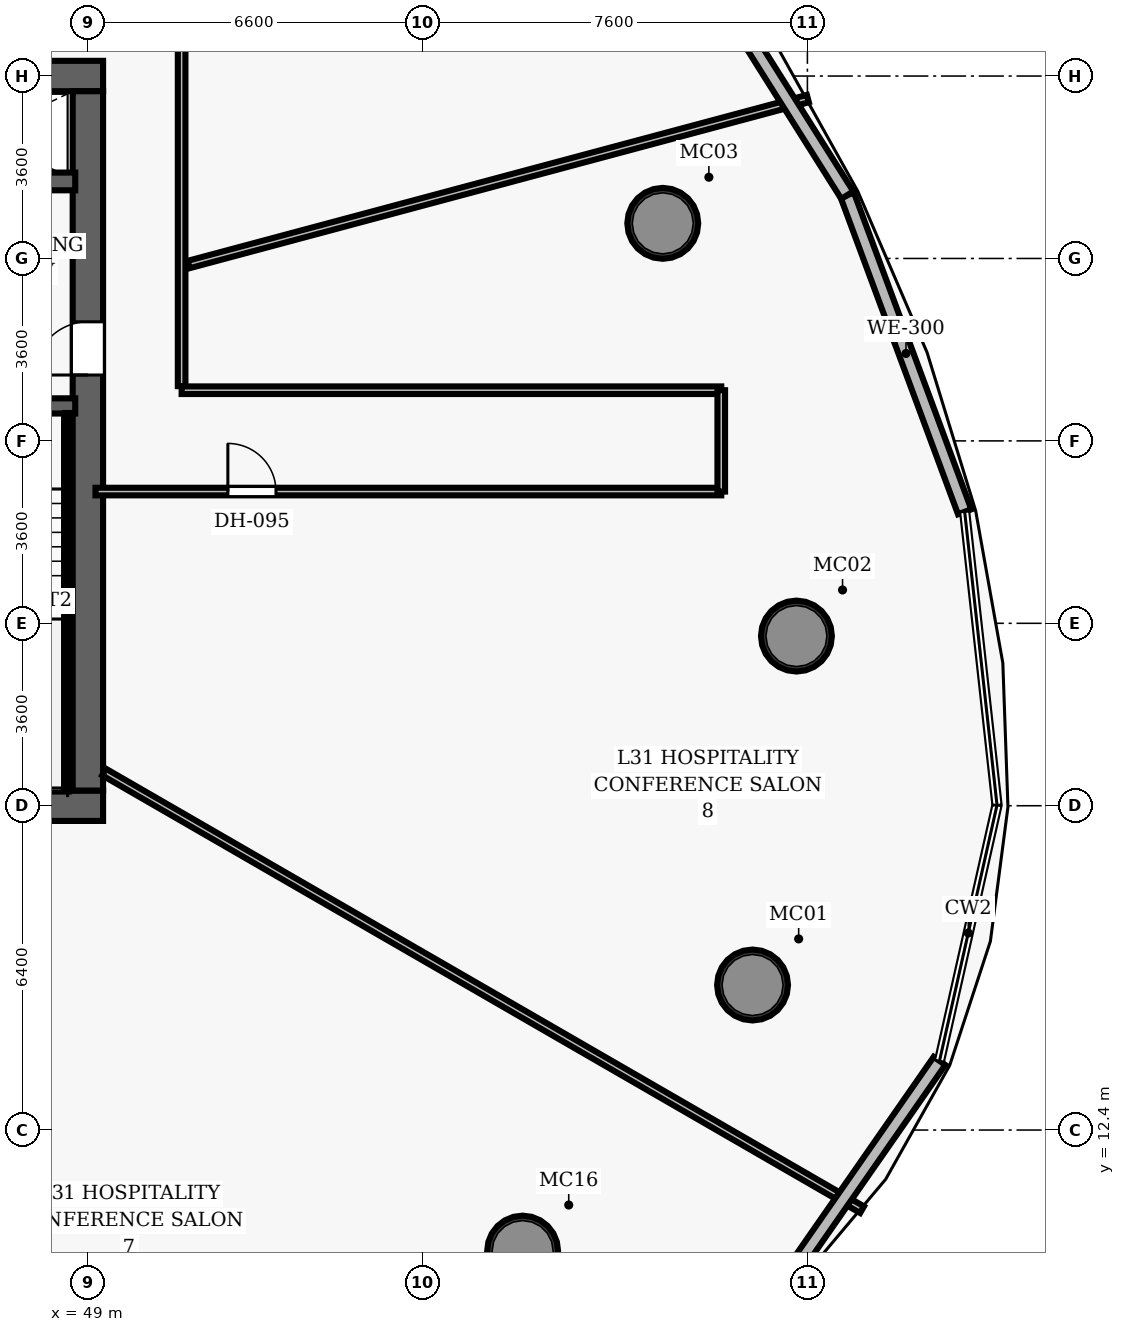
"""IFC4 building model, lengths in metres.
Left out: names, types, materials, properties, quantities, classifications, styles, units other than length and angle.
Written with IfcOpenShell. Run it as: python <this file> out.ifc"""

import sys

from ifc_helpers import new_model, si_unit, direction, frame, frame_2d, origin, origin_2d, place, context, subcontext, project, spatial, rectangle, hollow_circle, extrude, element, fill, save


model = new_model("IFC4")
c1 = context("Model", 3, precision=1e-05, world=origin(), true_north=direction((0.0, 1.0)))
c2 = subcontext(c1, "Body", "Model", "MODEL_VIEW")
j1 = project(units=[si_unit("LENGTHUNIT", "METRE"), si_unit("PLANEANGLEUNIT", "RADIAN")], contexts=[c1])
p1 = place(None, origin())
s1 = spatial("IfcSite", under=j1, at=p1, CompositionType="ELEMENT")
p2 = place(p1, origin())
s2 = spatial("IfcBuilding", under=s1, at=p2, CompositionType="ELEMENT")
p3 = place(p2, frame((0.0, 0.0, 127.3)))
s3 = spatial("IfcBuildingStorey", under=s2, at=p3, CompositionType="ELEMENT", Elevation=127.3)
p4 = place(p3, frame((26.7, 18.8, 0.0), z_axis=(0.0, 0.0, 1.0), x_axis=(1.0, 0.0, 0.0)))
e1 = element("IfcWall", 1, at=p4, inside=s3, PredefinedType="SHEAR", context=c2, shape_type="SweptSolid", body=[
    extrude(rectangle(XDim=22.6, YDim=0.6, at=frame_2d((11.3, 0.0))), origin(), (0.0, 0.0, 1.0), 3.5),
])
p5 = place(p4, frame((14.52, 0.0, 0.0)))
e2 = element("IfcOpeningElement", 2, at=p5, cuts=e1, PredefinedType="OPENING", context=c2, shape_type="SweptSolid", body=[
    extrude(rectangle(XDim=1.05, YDim=2.15, at=frame_2d((0.525, 1.075))), frame((0.0, 0.31, 0.0), z_axis=(0.0, -1.0, 0.0), x_axis=(1.0, 0.0, 0.0)), (0.0, 0.0, 1.0), 0.62),
])
p6 = place(p3, frame((26.7, 33.2, 0.0), z_axis=(0.0, 0.0, 1.0), x_axis=(1.0, 0.0, 0.0)))
e3 = element("IfcWall", 3, at=p6, inside=s3, PredefinedType="SHEAR", context=c2, shape_type="SweptSolid", body=[
    extrude(rectangle(XDim=22.6, YDim=0.6, at=frame_2d((11.3, 0.0))), origin(), (0.0, 0.0, 1.0), 3.5),
])
p7 = place(p6, frame((4.62, 0.0, 0.0)))
e4 = element("IfcOpeningElement", 4, at=p7, cuts=e3, PredefinedType="OPENING", context=c2, shape_type="SweptSolid", body=[
    extrude(rectangle(XDim=1.05, YDim=2.15, at=frame_2d((0.525, 1.075))), frame((0.0, 0.31, 0.0), z_axis=(0.0, -1.0, 0.0), x_axis=(1.0, 0.0, 0.0)), (0.0, 0.0, 1.0), 0.62),
])
p8 = place(p6, frame((14.52, 0.0, 0.0)))
e5 = element("IfcOpeningElement", 5, at=p8, cuts=e3, PredefinedType="OPENING", context=c2, shape_type="SweptSolid", body=[
    extrude(rectangle(XDim=1.05, YDim=2.15, at=frame_2d((0.525, 1.075))), frame((0.0, 0.31, 0.0), z_axis=(0.0, -1.0, 0.0), x_axis=(1.0, 0.0, 0.0)), (0.0, 0.0, 1.0), 0.62),
])
p9 = place(p3, frame((49.0, 19.1, 0.0), z_axis=(0.0, 0.0, 1.0), x_axis=(0.0, 1.0, 0.0)))
e6 = element("IfcWall", 6, at=p9, inside=s3, PredefinedType="SHEAR", context=c2, shape_type="SweptSolid", body=[
    extrude(rectangle(XDim=13.8, YDim=0.6, at=frame_2d((6.9, 0.0))), origin(), (0.0, 0.0, 1.0), 3.5),
])
p10 = place(p9, frame((8.2, 0.0, 0.0)))
e7 = element("IfcOpeningElement", 7, at=p10, cuts=e6, PredefinedType="OPENING", context=c2, shape_type="SweptSolid", body=[
    extrude(rectangle(XDim=1.05, YDim=2.15, at=frame_2d((0.525, 1.075))), frame((0.0, 0.31, 0.0), z_axis=(0.0, -1.0, 0.0), x_axis=(1.0, 0.0, 0.0)), (0.0, 0.0, 1.0), 0.62),
])
for number, where, z_axis, x_axis in (
    (8, (62.118, 15.262, 0.0), (0.0, 0.0, 1.0), (1.0, 0.0, 0.0)),
    (9, (62.984, 22.148, 0.0), (0.0, 0.0, 1.0), (1.0, 0.0, 0.0)),
    (10, (60.346, 30.293, 0.0), (0.0, 0.0, 1.0), (1.0, 0.0, 0.0)),
    (11, (57.58, 10.011, 0.0), (0.0, 0.0, 1.0), (1.0, 0.0, 0.0)),
):
    element("IfcColumn", number, at=place(p3, frame(where, z_axis=z_axis, x_axis=x_axis)), inside=s3, PredefinedType="COLUMN", context=c2, shape_type="SweptSolid", body=[
        extrude(hollow_circle(Radius=0.7, WallThickness=0.055, at=origin_2d()), origin(), (0.0, 0.0, 1.0), 3.5),
    ])
p11 = place(p3, frame((45.08, 26.69, 0.0), z_axis=(0.0, 0.0, 1.0), x_axis=(1.0, 0.0, 0.0)))
e12 = element("IfcWall", 12, at=p11, inside=s3, PredefinedType="SHEAR", context=c2, shape_type="SweptSolid", body=[
    extrude(rectangle(XDim=3.67, YDim=0.3, at=frame_2d((1.835, 0.0))), origin(), (0.0, 0.0, 1.0), 3.5),
])
p12 = place(p11, frame((1.05, 0.0, 0.0)))
e13 = element("IfcOpeningElement", 13, at=p12, cuts=e12, PredefinedType="OPENING", context=c2, shape_type="SweptSolid", body=[
    extrude(rectangle(XDim=1.1, YDim=2.15, at=frame_2d((0.55, 1.075))), frame((0.0, 0.16, 0.0), z_axis=(0.0, -1.0, 0.0), x_axis=(1.0, 0.0, 0.0)), (0.0, 0.0, 1.0), 0.32),
])
p13 = place(p3, frame((48.605, 19.1, 0.0), z_axis=(0.0, 0.0, 1.0), x_axis=(0.0, 1.0, 0.0)))
e14 = element("IfcWall", 14, at=p13, inside=s3, PredefinedType="SHEAR", context=c2, shape_type="SweptSolid", body=[
    extrude(rectangle(XDim=7.45, YDim=0.12, at=frame_2d((3.725, 0.0))), origin(), (0.0, 0.0, 1.0), 3.5),
])
p14 = place(p3, frame((45.51, 19.16, 0.0), z_axis=(0.0, 0.0, 1.0), x_axis=(1.0, 0.0, 0.0)))
e15 = element("IfcWall", 15, at=p14, inside=s3, PredefinedType="SHEAR", context=c2, shape_type="SweptSolid", body=[
    extrude(rectangle(XDim=3.095, YDim=0.12, at=frame_2d((1.547, 0.0))), origin(), (0.0, 0.0, 1.0), 3.5),
])
p15 = place(p3, frame((45.08, 31.12, 0.0), z_axis=(0.0, 0.0, 1.0), x_axis=(1.0, 0.0, 0.0)))
e16 = element("IfcWall", 16, at=p15, inside=s3, PredefinedType="SHEAR", context=c2, shape_type="SweptSolid", body=[
    extrude(rectangle(XDim=3.67, YDim=0.35, at=frame_2d((1.835, 0.0))), origin(), (0.0, 0.0, 1.0), 2.675),
])
p16 = place(p15, frame((1.25, 0.0, 0.0)))
e17 = element("IfcOpeningElement", 17, at=p16, cuts=e16, PredefinedType="OPENING", context=c2, shape_type="SweptSolid", body=[
    extrude(rectangle(XDim=1.1, YDim=2.15, at=frame_2d((0.55, 1.075))), frame((0.0, 0.185, 0.0), z_axis=(0.0, -1.0, 0.0), x_axis=(1.0, 0.0, 0.0)), (0.0, 0.0, 1.0), 0.37),
])
p17 = place(p3, frame((50.85, 27.08, 0.0), z_axis=(0.0, 0.0, 1.0), x_axis=(0.0, 1.0, 0.0)))
e18 = element("IfcWall", 18, at=p17, inside=s3, PredefinedType="PARTITIONING", context=c2, shape_type="SweptSolid", body=[
    extrude(rectangle(XDim=8.12, YDim=0.15, at=frame_2d((4.06, 0.0))), origin(), (0.0, 0.0, 1.0), 2.675),
])
p18 = place(p3, frame((50.85, 27.0, 0.0), z_axis=(0.0, 0.0, 1.0), x_axis=(1.0, 0.0, 0.0)))
e19 = element("IfcWall", 19, at=p18, inside=s3, PredefinedType="PARTITIONING", context=c2, shape_type="SweptSolid", body=[
    extrude(rectangle(XDim=10.65, YDim=0.15, at=frame_2d((5.325, 0.0))), origin(), (0.0, 0.0, 1.0), 2.675),
])
p19 = place(p3, frame((49.15, 25.0, 0.0), z_axis=(0.0, 0.0, 1.0), x_axis=(1.0, 0.0, 0.0)))
e20 = element("IfcWall", 20, at=p19, inside=s3, PredefinedType="PARTITIONING", context=c2, shape_type="SweptSolid", body=[
    extrude(rectangle(XDim=12.35, YDim=0.15, at=frame_2d((6.175, 0.0))), origin(), (0.0, 0.0, 1.0), 2.675),
])
p20 = place(p19, frame((2.613, 0.0, 0.0)))
e21 = element("IfcOpeningElement", 21, at=p20, cuts=e20, PredefinedType="OPENING", context=c2, shape_type="SweptSolid", body=[
    extrude(rectangle(XDim=0.95, YDim=2.15, at=frame_2d((0.475, 1.075))), frame((0.0, 0.085, 0.0), z_axis=(0.0, -1.0, 0.0), x_axis=(1.0, 0.0, 0.0)), (0.0, 0.0, 1.0), 0.17),
])
p21 = place(p3, frame((61.5, 25.0, 0.0), z_axis=(0.0, 0.0, 1.0), x_axis=(0.0, 1.0, 0.0)))
e22 = element("IfcWall", 22, at=p21, inside=s3, PredefinedType="PARTITIONING", context=c2, shape_type="SweptSolid", body=[
    extrude(rectangle(XDim=2.0, YDim=0.15, at=frame_2d((1.0, 0.0))), origin(), (0.0, 0.0, 1.0), 2.675),
])
p22 = place(p3, frame((50.99, 29.481, 0.0), z_axis=(0.0, 0.0, 1.0), x_axis=(0.965926429522, 0.258816793797, 0.0)))
e23 = element("IfcWall", 23, at=p22, inside=s3, PredefinedType="PARTITIONING", context=c2, shape_type="SweptSolid", body=[
    extrude(rectangle(XDim=12.651, YDim=0.15, at=frame_2d((6.325, 0.0))), origin(), (0.0, 0.0, 1.0), 2.675),
])
p23 = place(p3, frame((49.32, 19.464, 0.0), z_axis=(0.0, 0.0, 1.0), x_axis=(0.866026939975, -0.499997339231, 0.0)))
e24 = element("IfcWall", 24, at=p23, inside=s3, PredefinedType="PARTITIONING", context=c2, shape_type="SweptSolid", body=[
    extrude(rectangle(XDim=17.272, YDim=0.15, at=frame_2d((8.636, 0.0))), origin(), (0.0, 0.0, 1.0), 2.675),
])
p24 = place(p3, frame((63.988, 30.85, 0.0), z_axis=(0.0, 0.0, 1.0), x_axis=(0.347548177942, -0.937662126786, 0.0)))
e25 = element("IfcWall", 25, at=p24, inside=s3, PredefinedType="SOLIDWALL", context=c2, shape_type="SweptSolid", body=[
    extrude(rectangle(XDim=6.665, YDim=0.28, at=frame_2d((3.333, 0.0))), origin(), (0.0, 0.0, 1.0), 3.26),
])
p25 = place(p3, frame((60.099, 37.019, 0.0), z_axis=(0.0, 0.0, 1.0), x_axis=(0.533224356751, -0.845973868017, 0.0)))
e26 = element("IfcWall", 26, at=p25, inside=s3, PredefinedType="SOLIDWALL", context=c2, shape_type="SweptSolid", body=[
    extrude(rectangle(XDim=7.292, YDim=0.28, at=frame_2d((3.646, 0.0))), origin(), (0.0, 0.0, 1.0), 3.26),
])
p26 = place(p3, frame((65.807, 13.765, 0.0), z_axis=(0.0, 0.0, 1.0), x_axis=(-0.571097665785, -0.820882120731, 0.0)))
e27 = element("IfcWall", 27, at=p26, inside=s3, PredefinedType="SOLIDWALL", context=c2, shape_type="SweptSolid", body=[
    extrude(rectangle(XDim=5.174, YDim=0.28, at=frame_2d((2.587, 0.0))), origin(), (0.0, 0.0, 1.0), 3.26),
])
p27 = place(p10, origin())
e28 = element("IfcDoor", 28, at=p27, inside=s3, OperationType="SINGLE_SWING_LEFT", PredefinedType="DOOR", context=c2, shape_type="SweptSolid", body=[
    extrude(rectangle(XDim=1.05, YDim=2.15, at=frame_2d((0.525, 1.075))), frame((0.0, 0.025, 0.0), z_axis=(0.0, -1.0, 0.0), x_axis=(1.0, 0.0, 0.0)), (0.0, 0.0, 1.0), 0.05),
])
fill(e7, e28)
p28 = place(p20, origin())
e29 = element("IfcDoor", 29, at=p28, inside=s3, OperationType="SINGLE_SWING_LEFT", PredefinedType="DOOR", context=c2, shape_type="SweptSolid", body=[
    extrude(rectangle(XDim=0.95, YDim=2.15, at=frame_2d((0.475, 1.075))), frame((0.0, 0.025, 0.0), z_axis=(0.0, -1.0, 0.0), x_axis=(1.0, 0.0, 0.0)), (0.0, 0.0, 1.0), 0.05),
])
fill(e21, e29)
save(model, sys.argv[1])
